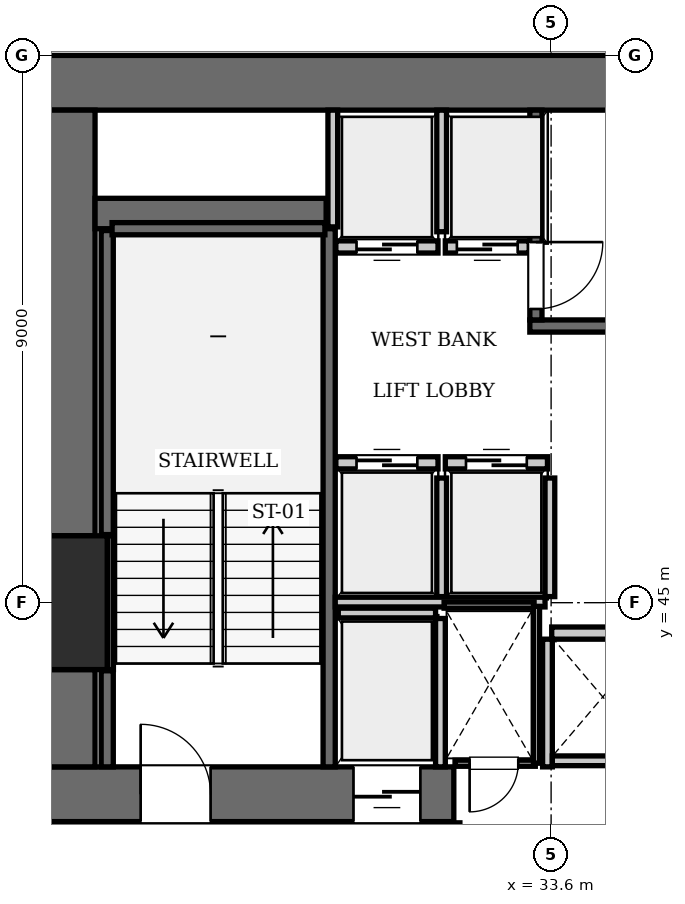
"""IFC4 building model, lengths in metres.
Left out: names, types, materials, properties, quantities, classifications, styles, units other than length and angle.
Written with IfcOpenShell. Run it as: python <this file> out.ifc"""

import sys

from ifc_helpers import new_model, si_unit, direction, frame, frame_2d, origin, origin_2d, place, context, subcontext, project, spatial, rectangle, extrude, element, fill, save


model = new_model("IFC4")
c1 = context("Model", 3, precision=1e-05, world=origin(), true_north=direction((0.0, 1.0)))
c2 = subcontext(c1, "Body", "Model", "MODEL_VIEW")
j1 = project(units=[si_unit("LENGTHUNIT", "METRE"), si_unit("PLANEANGLEUNIT", "RADIAN")], contexts=[c1])
p1 = place(None, origin())
s1 = spatial("IfcSite", under=j1, at=p1, CompositionType="ELEMENT")
p2 = place(p1, origin())
s2 = spatial("IfcBuilding", under=s1, at=p2, CompositionType="ELEMENT")
p3 = place(p2, frame((0.0, 0.0, 103.95)))
s3 = spatial("IfcBuildingStorey", under=s2, at=p3, CompositionType="ELEMENT", Elevation=103.95)
p4 = place(p3, frame((25.2, 45.0, 0.0), z_axis=(0.0, 0.0, 1.0), x_axis=(1.0, 0.0, 0.0)))
e1 = element("IfcColumn", 1, at=p4, inside=s3, PredefinedType="COLUMN", context=c2, shape_type="SweptSolid", body=[
    extrude(rectangle(XDim=2.2, YDim=2.2, at=origin_2d()), origin(), (0.0, 0.0, 1.0), 3.85),
])
p5 = place(p3, frame((25.2, 53.55, 0.0), z_axis=(0.0, 0.0, 1.0), x_axis=(1.0, 0.0, 0.0)))
e2 = element("IfcWall", 2, at=p5, inside=s3, PredefinedType="SHEAR", context=c2, shape_type="SweptSolid", body=[
    extrude(rectangle(XDim=25.2, YDim=0.9, at=frame_2d((12.6, 0.0))), origin(), (0.0, 0.0, 1.0), 3.85),
])
p6 = place(p3, frame((25.2, 41.85, 0.0), z_axis=(0.0, 0.0, 1.0), x_axis=(1.0, 0.0, 0.0)))
e3 = element("IfcWall", 3, at=p6, inside=s3, PredefinedType="SHEAR", context=c2, shape_type="SweptSolid", body=[
    extrude(rectangle(XDim=6.8, YDim=0.9, at=frame_2d((3.4, 0.0))), origin(), (0.0, 0.0, 1.0), 3.85),
])
p7 = place(p6, frame((1.65, 0.0, 0.0)))
e4 = element("IfcOpeningElement", 4, at=p7, cuts=e3, PredefinedType="OPENING", context=c2, shape_type="SweptSolid", body=[
    extrude(rectangle(XDim=1.15, YDim=2.15, at=frame_2d((0.575, 1.075))), frame((0.0, 0.46, 0.0), z_axis=(0.0, -1.0, 0.0), x_axis=(1.0, 0.0, 0.0)), (0.0, 0.0, 1.0), 0.92),
])
p8 = place(p6, frame((5.15, 0.0, 0.0)))
e5 = element("IfcOpeningElement", 5, at=p8, cuts=e3, PredefinedType="OPENING", context=c2, shape_type="SweptSolid", body=[
    extrude(rectangle(XDim=1.1, YDim=2.2, at=frame_2d((0.55, 1.1))), frame((0.0, 0.46, 0.0), z_axis=(0.0, -1.0, 0.0), x_axis=(1.0, 0.0, 0.0)), (0.0, 0.0, 1.0), 0.92),
])
p9 = place(p3, frame((25.65, 42.3, 0.0), z_axis=(0.0, 0.0, 1.0), x_axis=(0.0, 1.0, 0.0)))
e6 = element("IfcWall", 6, at=p9, inside=s3, PredefinedType="SHEAR", context=c2, shape_type="SweptSolid", body=[
    extrude(rectangle(XDim=1.6, YDim=0.9, at=frame_2d((0.8, 0.0))), origin(), (0.0, 0.0, 1.0), 3.85),
])
p10 = place(p3, frame((25.65, 46.1, 0.0), z_axis=(0.0, 0.0, 1.0), x_axis=(0.0, 1.0, 0.0)))
e7 = element("IfcWall", 7, at=p10, inside=s3, PredefinedType="SHEAR", context=c2, shape_type="SweptSolid", body=[
    extrude(rectangle(XDim=7.0, YDim=0.9, at=frame_2d((3.5, 0.0))), origin(), (0.0, 0.0, 1.0), 3.85),
])
p11 = place(p3, frame((26.1, 51.4, 0.0), z_axis=(0.0, 0.0, 1.0), x_axis=(1.0, 0.0, 0.0)))
e8 = element("IfcWall", 8, at=p11, inside=s3, PredefinedType="SHEAR", context=c2, shape_type="SweptSolid", body=[
    extrude(rectangle(XDim=3.8, YDim=0.5, at=frame_2d((1.9, 0.0))), origin(), (0.0, 0.0, 1.0), 3.85),
])
p12 = place(p3, frame((29.95, 42.3, 0.0), z_axis=(0.0, 0.0, 1.0), x_axis=(0.0, 1.0, 0.0)))
e9 = element("IfcWall", 9, at=p12, inside=s3, PredefinedType="SOLIDWALL", context=c2, shape_type="SweptSolid", body=[
    extrude(rectangle(XDim=8.85, YDim=0.2, at=frame_2d((4.425, 0.0))), origin(), (0.0, 0.0, 1.0), 3.61),
])
p13 = place(p3, frame((26.3, 42.3, 0.0), z_axis=(0.0, 0.0, 1.0), x_axis=(0.0, 1.0, 0.0)))
e10 = element("IfcWall", 10, at=p13, inside=s3, PredefinedType="SOLIDWALL", context=c2, shape_type="SweptSolid", body=[
    extrude(rectangle(XDim=1.58, YDim=0.2, at=frame_2d((0.79, 0.0))), origin(), (0.0, 0.0, 1.0), 3.61),
])
p14 = place(p3, frame((26.3, 46.12, 0.0), z_axis=(0.0, 0.0, 1.0), x_axis=(0.0, 1.0, 0.0)))
e11 = element("IfcWall", 11, at=p14, inside=s3, PredefinedType="SOLIDWALL", context=c2, shape_type="SweptSolid", body=[
    extrude(rectangle(XDim=5.0, YDim=0.2, at=frame_2d((2.5, 0.0))), origin(), (0.0, 0.0, 1.0), 3.61),
])
p15 = place(p3, frame((26.38, 51.15, 0.0), z_axis=(0.0, 0.0, 1.0), x_axis=(1.0, 0.0, 0.0)))
e12 = element("IfcWall", 12, at=p15, inside=s3, PredefinedType="SOLIDWALL", context=c2, shape_type="SweptSolid", body=[
    extrude(rectangle(XDim=3.5, YDim=0.2, at=frame_2d((1.75, 0.0))), origin(), (0.0, 0.0, 1.0), 3.61),
])
p16 = place(p3, frame((26.352, 43.9, 0.0), z_axis=(0.0, 0.0, 1.0), x_axis=(0.0, 1.0, 0.0)))
e13 = element("IfcWall", 13, at=p16, inside=s3, PredefinedType="SOLIDWALL", context=c2, shape_type="SweptSolid", body=[
    extrude(rectangle(XDim=2.2, YDim=0.1, at=frame_2d((1.1, 0.0))), origin(), (0.0, 0.0, 1.0), 3.61),
])
p17 = place(p3, frame((33.25, 49.55, 0.0), z_axis=(0.0, 0.0, 1.0), x_axis=(1.0, 0.0, 0.0)))
e14 = element("IfcWall", 14, at=p17, inside=s3, PredefinedType="SOLIDWALL", context=c2, shape_type="SweptSolid", body=[
    extrude(rectangle(XDim=9.1, YDim=0.2, at=frame_2d((4.55, 0.0))), origin(), (0.0, 0.0, 1.0), 3.61),
])
p18 = place(p3, frame((33.35, 49.65, 0.0), z_axis=(0.0, 0.0, 1.0), x_axis=(0.0, 1.0, 0.0)))
e15 = element("IfcWall", 15, at=p18, inside=s3, PredefinedType="SOLIDWALL", context=c2, shape_type="SweptSolid", body=[
    extrude(rectangle(XDim=3.45, YDim=0.2, at=frame_2d((1.725, 0.0))), origin(), (0.0, 0.0, 1.0), 3.61),
])
p19 = place(p18, frame((0.18, 0.0, 0.0)))
e16 = element("IfcOpeningElement", 16, at=p19, cuts=e15, PredefinedType="OPENING", context=c2, shape_type="SweptSolid", body=[
    extrude(rectangle(XDim=1.1, YDim=2.15, at=frame_2d((0.55, 1.075))), frame((0.0, 0.11, 0.0), z_axis=(0.0, -1.0, 0.0), x_axis=(1.0, 0.0, 0.0)), (0.0, 0.0, 1.0), 0.22),
])
p20 = place(p3, frame((30.06, 47.3, 0.0), z_axis=(0.0, 0.0, 1.0), x_axis=(1.0, 0.0, 0.0)))
e17 = element("IfcWall", 17, at=p20, inside=s3, PredefinedType="SOLIDWALL", context=c2, shape_type="SweptSolid", body=[
    extrude(rectangle(XDim=1.68, YDim=0.2, at=frame_2d((0.84, 0.0))), origin(), (0.0, 0.0, 1.0), 3.61),
])
p21 = place(p20, frame((0.34, 0.0, 0.0)))
e18 = element("IfcOpeningElement", 18, at=p21, cuts=e17, PredefinedType="OPENING", context=c2, shape_type="SweptSolid", body=[
    extrude(rectangle(XDim=1.0, YDim=2.15, at=frame_2d((0.5, 1.075))), frame((0.0, 0.11, 0.0), z_axis=(0.0, -1.0, 0.0), x_axis=(1.0, 0.0, 0.0)), (0.0, 0.0, 1.0), 0.22),
])
p22 = place(p3, frame((31.86, 47.3, 0.0), z_axis=(0.0, 0.0, 1.0), x_axis=(1.0, 0.0, 0.0)))
e19 = element("IfcWall", 19, at=p22, inside=s3, PredefinedType="SOLIDWALL", context=c2, shape_type="SweptSolid", body=[
    extrude(rectangle(XDim=1.68, YDim=0.2, at=frame_2d((0.84, 0.0))), origin(), (0.0, 0.0, 1.0), 3.61),
])
p23 = place(p22, frame((0.34, 0.0, 0.0)))
e20 = element("IfcOpeningElement", 20, at=p23, cuts=e19, PredefinedType="OPENING", context=c2, shape_type="SweptSolid", body=[
    extrude(rectangle(XDim=1.0, YDim=2.15, at=frame_2d((0.5, 1.075))), frame((0.0, 0.11, 0.0), z_axis=(0.0, -1.0, 0.0), x_axis=(1.0, 0.0, 0.0)), (0.0, 0.0, 1.0), 0.22),
])
p24 = place(p3, frame((30.06, 50.85, 0.0), z_axis=(0.0, 0.0, 1.0), x_axis=(1.0, 0.0, 0.0)))
e21 = element("IfcWall", 21, at=p24, inside=s3, PredefinedType="SOLIDWALL", context=c2, shape_type="SweptSolid", body=[
    extrude(rectangle(XDim=1.68, YDim=0.2, at=frame_2d((0.84, 0.0))), origin(), (0.0, 0.0, 1.0), 3.61),
])
p25 = place(p24, frame((0.34, 0.0, 0.0)))
e22 = element("IfcOpeningElement", 22, at=p25, cuts=e21, PredefinedType="OPENING", context=c2, shape_type="SweptSolid", body=[
    extrude(rectangle(XDim=1.0, YDim=2.15, at=frame_2d((0.5, 1.075))), frame((0.0, 0.11, 0.0), z_axis=(0.0, -1.0, 0.0), x_axis=(1.0, 0.0, 0.0)), (0.0, 0.0, 1.0), 0.22),
])
p26 = place(p3, frame((31.86, 50.85, 0.0), z_axis=(0.0, 0.0, 1.0), x_axis=(1.0, 0.0, 0.0)))
e23 = element("IfcWall", 23, at=p26, inside=s3, PredefinedType="SOLIDWALL", context=c2, shape_type="SweptSolid", body=[
    extrude(rectangle(XDim=1.38, YDim=0.2, at=frame_2d((0.69, 0.0))), origin(), (0.0, 0.0, 1.0), 3.61),
])
p27 = place(p26, frame((0.19, 0.0, 0.0)))
e24 = element("IfcOpeningElement", 24, at=p27, cuts=e23, PredefinedType="OPENING", context=c2, shape_type="SweptSolid", body=[
    extrude(rectangle(XDim=1.0, YDim=2.15, at=frame_2d((0.5, 1.075))), frame((0.0, 0.11, 0.0), z_axis=(0.0, -1.0, 0.0), x_axis=(1.0, 0.0, 0.0)), (0.0, 0.0, 1.0), 0.22),
])
p28 = place(p3, frame((33.61, 44.5, 0.0), z_axis=(0.0, 0.0, 1.0), x_axis=(1.0, 0.0, 0.0)))
e25 = element("IfcWall", 25, at=p28, inside=s3, PredefinedType="SOLIDWALL", context=c2, shape_type="SweptSolid", body=[
    extrude(rectangle(XDim=1.68, YDim=0.2, at=frame_2d((0.84, 0.0))), origin(), (0.0, 0.0, 1.0), 3.61),
])
p29 = place(p3, frame((30.1, 44.83, 0.0), z_axis=(0.0, 0.0, 1.0), x_axis=(1.0, 0.0, 0.0)))
e26 = element("IfcWall", 26, at=p29, inside=s3, PredefinedType="SOLIDWALL", context=c2, shape_type="SweptSolid", body=[
    extrude(rectangle(XDim=1.6, YDim=0.16, at=frame_2d((0.8, 0.0))), origin(), (0.0, 0.0, 1.0), 3.61),
])
p30 = place(p3, frame((31.78, 42.3, 0.0), z_axis=(0.0, 0.0, 1.0), x_axis=(0.0, 1.0, 0.0)))
e27 = element("IfcWall", 27, at=p30, inside=s3, PredefinedType="SOLIDWALL", context=c2, shape_type="SweptSolid", body=[
    extrude(rectangle(XDim=2.44, YDim=0.16, at=frame_2d((1.22, 0.0))), origin(), (0.0, 0.0, 1.0), 3.61),
])
for number, where, z_axis, x_axis in (
    (28, (31.8, 45.1, 0.0), (0.0, 0.0, 1.0), (0.0, 1.0, 0.0)),
    (29, (33.58, 45.1, 0.0), (0.0, 0.0, 1.0), (0.0, 1.0, 0.0)),
):
    element("IfcWall", number, at=place(p3, frame(where, z_axis=z_axis, x_axis=x_axis)), inside=s3, PredefinedType="SOLIDWALL", context=c2, shape_type="SweptSolid", body=[
        extrude(rectangle(XDim=1.95, YDim=0.16, at=frame_2d((0.975, 0.0))), origin(), (0.0, 0.0, 1.0), 3.61),
    ])
p31 = place(p3, frame((30.05, 45.01, 0.0), z_axis=(0.0, 0.0, 1.0), x_axis=(1.0, 0.0, 0.0)))
e30 = element("IfcWall", 30, at=p31, inside=s3, PredefinedType="SOLIDWALL", context=c2, shape_type="SweptSolid", body=[
    extrude(rectangle(XDim=3.45, YDim=0.16, at=frame_2d((1.725, 0.0))), origin(), (0.0, 0.0, 1.0), 3.61),
])
p32 = place(p3, frame((30.01, 51.18, 0.0), z_axis=(0.0, 0.0, 1.0), x_axis=(0.0, 1.0, 0.0)))
e31 = element("IfcWall", 31, at=p32, inside=s3, PredefinedType="SOLIDWALL", context=c2, shape_type="SweptSolid", body=[
    extrude(rectangle(XDim=1.92, YDim=0.16, at=frame_2d((0.96, 0.0))), origin(), (0.0, 0.0, 1.0), 3.61),
])
p33 = place(p3, frame((31.8, 51.1, 0.0), z_axis=(0.0, 0.0, 1.0), x_axis=(0.0, 1.0, 0.0)))
e32 = element("IfcWall", 32, at=p33, inside=s3, PredefinedType="SOLIDWALL", context=c2, shape_type="SweptSolid", body=[
    extrude(rectangle(XDim=2.0, YDim=0.16, at=frame_2d((1.0, 0.0))), origin(), (0.0, 0.0, 1.0), 3.61),
])
p34 = place(p3, frame((33.54, 42.3, 0.0), z_axis=(0.0, 0.0, 1.0), x_axis=(0.0, 1.0, 0.0)))
e33 = element("IfcWall", 33, at=p34, inside=s3, PredefinedType="SOLIDWALL", context=c2, shape_type="SweptSolid", body=[
    extrude(rectangle(XDim=2.1, YDim=0.16, at=frame_2d((1.05, 0.0))), origin(), (0.0, 0.0, 1.0), 3.61),
])
p35 = place(p3, frame((33.62, 42.4, 0.0), z_axis=(0.0, 0.0, 1.0), x_axis=(1.0, 0.0, 0.0)))
e34 = element("IfcWall", 34, at=p35, inside=s3, PredefinedType="SOLIDWALL", context=c2, shape_type="SweptSolid", body=[
    extrude(rectangle(XDim=1.66, YDim=0.16, at=frame_2d((0.83, 0.0))), origin(), (0.0, 0.0, 1.0), 3.61),
])
for number, where, z_axis, x_axis in (
    (35, (26.2, 38.31, 0.0), (0.0, 0.0, 1.0), (0.0, 1.0, 0.0)),
    (36, (32.0, 38.31, 0.0), (0.0, 0.0, 1.0), (0.0, 1.0, 0.0)),
):
    element("IfcWall", number, at=place(p3, frame(where, z_axis=z_axis, x_axis=x_axis)), inside=s3, PredefinedType="PARTITIONING", context=c2, shape_type="SweptSolid", body=[
        extrude(rectangle(XDim=3.07, YDim=0.2, at=frame_2d((1.535, 0.0))), origin(), (0.0, 0.0, 1.0), 3.61),
    ])
p36 = place(p3, frame((32.02, 42.36, 0.0), z_axis=(0.0, 0.0, 1.0), x_axis=(1.0, 0.0, 0.0)))
e37 = element("IfcWall", 37, at=p36, inside=s3, PredefinedType="PARTITIONING", context=c2, shape_type="SweptSolid", body=[
    extrude(rectangle(XDim=1.32, YDim=0.1, at=frame_2d((0.66, 0.0))), origin(), (0.0, 0.0, 1.0), 3.61),
])
p37 = place(p36, frame((0.24, 0.0, 0.0)))
e38 = element("IfcOpeningElement", 38, at=p37, cuts=e37, PredefinedType="OPENING", context=c2, shape_type="SweptSolid", body=[
    extrude(rectangle(XDim=0.8, YDim=2.05, at=frame_2d((0.4, 1.025))), frame((0.0, 0.06, 0.0), z_axis=(0.0, -1.0, 0.0), x_axis=(1.0, 0.0, 0.0)), (0.0, 0.0, 1.0), 0.12),
])
p38 = place(p3, frame((31.84, 44.96, 0.0), z_axis=(0.0, 0.0, 1.0), x_axis=(1.0, 0.0, 0.0)))
e39 = element("IfcWall", 39, at=p38, inside=s3, PredefinedType="PARTITIONING", context=c2, shape_type="SweptSolid", body=[
    extrude(rectangle(XDim=1.48, YDim=0.1, at=frame_2d((0.74, 0.0))), origin(), (0.0, 0.0, 1.0), 3.61),
])
p39 = place(p3, frame((33.36, 42.36, 0.0), z_axis=(0.0, 0.0, 1.0), x_axis=(0.0, 1.0, 0.0)))
e40 = element("IfcWall", 40, at=p39, inside=s3, PredefinedType="PARTITIONING", context=c2, shape_type="SweptSolid", body=[
    extrude(rectangle(XDim=2.58, YDim=0.1, at=frame_2d((1.29, 0.0))), origin(), (0.0, 0.0, 1.0), 3.61),
])
p40 = place(p7, origin())
e41 = element("IfcDoor", 41, at=p40, inside=s3, OperationType="SINGLE_SWING_LEFT", PredefinedType="DOOR", context=c2, shape_type="SweptSolid", body=[
    extrude(rectangle(XDim=1.15, YDim=2.15, at=frame_2d((0.575, 1.075))), frame((0.0, 0.025, 0.0), z_axis=(0.0, -1.0, 0.0), x_axis=(1.0, 0.0, 0.0)), (0.0, 0.0, 1.0), 0.05),
])
fill(e4, e41)
p41 = place(p19, frame((1.1, 0.0, 0.0), z_axis=(0.0, 0.0, 1.0), x_axis=(-1.0, 0.0, 0.0)))
e42 = element("IfcDoor", 42, at=p41, inside=s3, OperationType="SINGLE_SWING_LEFT", PredefinedType="DOOR", context=c2, shape_type="SweptSolid", body=[
    extrude(rectangle(XDim=1.1, YDim=2.15, at=frame_2d((0.55, 1.075))), frame((0.0, 0.025, 0.0), z_axis=(0.0, -1.0, 0.0), x_axis=(1.0, 0.0, 0.0)), (0.0, 0.0, 1.0), 0.05),
])
fill(e16, e42)
p42 = place(p21, origin())
e43 = element("IfcDoor", 43, at=p42, inside=s3, OperationType="SLIDING_TO_LEFT", PredefinedType="DOOR", context=c2, shape_type="SweptSolid", body=[
    extrude(rectangle(XDim=1.0, YDim=2.15, at=frame_2d((0.5, 1.075))), frame((0.0, 0.025, 0.0), z_axis=(0.0, -1.0, 0.0), x_axis=(1.0, 0.0, 0.0)), (0.0, 0.0, 1.0), 0.05),
])
fill(e18, e43)
p43 = place(p23, origin())
e44 = element("IfcDoor", 44, at=p43, inside=s3, OperationType="SLIDING_TO_LEFT", PredefinedType="DOOR", context=c2, shape_type="SweptSolid", body=[
    extrude(rectangle(XDim=1.0, YDim=2.15, at=frame_2d((0.5, 1.075))), frame((0.0, 0.025, 0.0), z_axis=(0.0, -1.0, 0.0), x_axis=(1.0, 0.0, 0.0)), (0.0, 0.0, 1.0), 0.05),
])
fill(e20, e44)
p44 = place(p25, frame((1.0, 0.0, 0.0), z_axis=(0.0, 0.0, 1.0), x_axis=(-1.0, 0.0, 0.0)))
e45 = element("IfcDoor", 45, at=p44, inside=s3, OperationType="SLIDING_TO_LEFT", PredefinedType="DOOR", context=c2, shape_type="SweptSolid", body=[
    extrude(rectangle(XDim=1.0, YDim=2.15, at=frame_2d((0.5, 1.075))), frame((0.0, 0.025, 0.0), z_axis=(0.0, -1.0, 0.0), x_axis=(1.0, 0.0, 0.0)), (0.0, 0.0, 1.0), 0.05),
])
fill(e22, e45)
p45 = place(p27, frame((1.0, 0.0, 0.0), z_axis=(0.0, 0.0, 1.0), x_axis=(-1.0, 0.0, 0.0)))
e46 = element("IfcDoor", 46, at=p45, inside=s3, OperationType="SLIDING_TO_LEFT", PredefinedType="DOOR", context=c2, shape_type="SweptSolid", body=[
    extrude(rectangle(XDim=1.0, YDim=2.15, at=frame_2d((0.5, 1.075))), frame((0.0, 0.025, 0.0), z_axis=(0.0, -1.0, 0.0), x_axis=(1.0, 0.0, 0.0)), (0.0, 0.0, 1.0), 0.05),
])
fill(e24, e46)
p46 = place(p8, frame((1.1, 0.0, 0.0), z_axis=(0.0, 0.0, 1.0), x_axis=(-1.0, 0.0, 0.0)))
e47 = element("IfcDoor", 47, at=p46, inside=s3, OperationType="SLIDING_TO_LEFT", PredefinedType="DOOR", context=c2, shape_type="SweptSolid", body=[
    extrude(rectangle(XDim=1.1, YDim=2.2, at=frame_2d((0.55, 1.1))), frame((0.0, 0.025, 0.0), z_axis=(0.0, -1.0, 0.0), x_axis=(1.0, 0.0, 0.0)), (0.0, 0.0, 1.0), 0.05),
])
fill(e5, e47)
p47 = place(p37, frame((0.8, 0.0, 0.0), z_axis=(0.0, 0.0, 1.0), x_axis=(-1.0, 0.0, 0.0)))
e48 = element("IfcDoor", 48, at=p47, inside=s3, OperationType="SINGLE_SWING_RIGHT", PredefinedType="DOOR", context=c2, shape_type="SweptSolid", body=[
    extrude(rectangle(XDim=0.8, YDim=2.05, at=frame_2d((0.4, 1.025))), frame((0.0, 0.025, 0.0), z_axis=(0.0, -1.0, 0.0), x_axis=(1.0, 0.0, 0.0)), (0.0, 0.0, 1.0), 0.05),
])
fill(e38, e48)
save(model, sys.argv[1])
